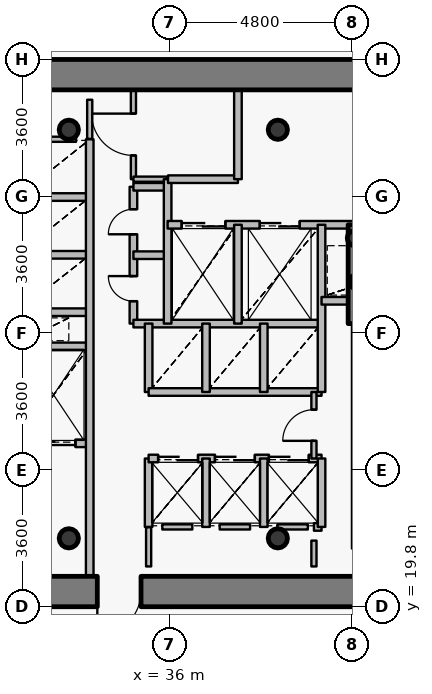
"""IFC4 building model, lengths in metres.
Left out: names, types, materials, properties, quantities, classifications, styles, units other than length and angle.
Written with IfcOpenShell. Run it as: python <this file> out.ifc"""

import sys

from ifc_helpers import new_model, si_unit, direction, frame, frame_2d, origin, origin_2d, place, context, subcontext, project, spatial, rectangle, hollow_circle, extrude, source, transform, mapped, element, fill, save


model = new_model("IFC4")
c1 = context("Model", 3, precision=1e-05, world=origin(), true_north=direction((0.0, 1.0)))
c2 = subcontext(c1, "Body", "Model", "MODEL_VIEW")
j1 = project(units=[si_unit("LENGTHUNIT", "METRE"), si_unit("PLANEANGLEUNIT", "RADIAN")], contexts=[c1])
p1 = place(None, origin())
s1 = spatial("IfcSite", under=j1, at=p1, CompositionType="ELEMENT")
p2 = place(p1, origin())
s2 = spatial("IfcBuilding", under=s1, at=p2, CompositionType="ELEMENT")
p3 = place(p2, frame((0.0, 0.0, 142.2)))
s3 = spatial("IfcBuildingStorey", under=s2, at=p3, CompositionType="ELEMENT", Elevation=142.2)
for number, where, z_axis, x_axis in (
    (1, (33.35, 21.6, 0.0), (0.0, 0.0, 1.0), (1.0, 0.0, 0.0)),
    (2, (38.85, 21.6, 0.0), (0.0, 0.0, 1.0), (1.0, 0.0, 0.0)),
    (3, (38.85, 32.35, 0.0), (0.0, 0.0, 1.0), (1.0, 0.0, 0.0)),
    (4, (33.35, 32.35, 0.0), (0.0, 0.0, 1.0), (1.0, 0.0, 0.0)),
):
    element("IfcColumn", number, at=place(p3, frame(where, z_axis=z_axis, x_axis=x_axis)), inside=s3, PredefinedType="COLUMN", context=c2, shape_type="SweptSolid", body=[
        extrude(hollow_circle(Radius=0.254, WallThickness=0.02, at=origin_2d()), origin(), (0.0, 0.0, 1.0), 3.75),
    ])
for number, where, z_axis, x_axis in (
    (5, (40.95, 28.35, 0.0), (0.0, 0.0, 1.0), (1.0, 0.0, 0.0)),
    (6, (40.88, 29.5, 0.0), (0.0, 0.0, 1.0), (1.0, 0.0, 0.0)),
):
    element("IfcColumn", number, at=place(p3, frame(where, z_axis=z_axis, x_axis=x_axis)), inside=s3, PredefinedType="COLUMN", context=c2, shape_type="SweptSolid", body=[
        extrude(hollow_circle(Radius=0.203, WallThickness=0.016, at=origin_2d()), origin(), (0.0, 0.0, 1.0), 3.75),
    ])
p4 = place(p3, frame((26.6, 33.8, 0.0), z_axis=(0.0, 0.0, 1.0), x_axis=(1.0, 0.0, 0.0)))
e7 = element("IfcWall", 7, at=p4, inside=s3, PredefinedType="SHEAR", context=c2, shape_type="SweptSolid", body=[
    extrude(rectangle(XDim=18.8, YDim=0.8, at=frame_2d((9.4, 0.0))), origin(), (0.0, 0.0, 1.0), 2.9),
])
p5 = place(p3, frame((45.4, 20.2, 0.0), z_axis=(0.0, 0.0, 1.0), x_axis=(-1.0, 0.0, 0.0)))
e8 = element("IfcWall", 8, at=p5, inside=s3, PredefinedType="SHEAR", context=c2, shape_type="SweptSolid", body=[
    extrude(rectangle(XDim=18.8, YDim=0.8, at=frame_2d((9.4, 0.0))), origin(), (0.0, 0.0, 1.0), 2.9),
])
p6 = place(p5, frame((10.15, 0.0, 0.0)))
e9 = element("IfcOpeningElement", 9, at=p6, cuts=e8, PredefinedType="OPENING", context=c2, shape_type="SweptSolid", body=[
    extrude(rectangle(XDim=1.15, YDim=2.15, at=origin_2d()), frame((0.575, 0.41, 1.075), z_axis=(0.0, -1.0, 0.0), x_axis=(1.0, 0.0, 0.0)), (0.0, 0.0, 1.0), 0.82),
])
p7 = place(p3, frame((40.9, 27.25, 0.0), z_axis=(0.0, 0.0, 1.0), x_axis=(0.0, 1.0, 0.0)))
e10 = element("IfcWall", 10, at=p7, inside=s3, PredefinedType="SHEAR", context=c2, shape_type="SweptSolid", body=[
    extrude(rectangle(XDim=2.6, YDim=0.4, at=frame_2d((1.3, 0.0))), origin(), (0.0, 0.0, 1.0), 3.05),
])
p8 = place(p3, frame((32.0, 24.1, 0.0), z_axis=(0.0, 0.0, 1.0), x_axis=(1.0, 0.0, 0.0)))
e11 = element("IfcWall", 11, at=p8, inside=s3, PredefinedType="PARTITIONING", context=c2, shape_type="SweptSolid", body=[
    extrude(rectangle(XDim=1.9, YDim=0.2, at=frame_2d((0.95, 0.0))), origin(), (0.0, 0.0, 1.0), 3.035),
])
p9 = place(p8, frame((0.375, 0.0, 0.0)))
e12 = element("IfcOpeningElement", 12, at=p9, cuts=e11, PredefinedType="OPENING", context=c2, shape_type="SweptSolid", body=[
    extrude(rectangle(XDim=1.15, YDim=2.15, at=origin_2d()), frame((0.575, 0.11, 1.075), z_axis=(0.0, -1.0, 0.0), x_axis=(1.0, 0.0, 0.0)), (0.0, 0.0, 1.0), 0.22),
])
for number, where, z_axis, x_axis in (
    (13, (32.0, 26.65, 0.0), (0.0, 0.0, 1.0), (1.0, 0.0, 0.0)),
    (14, (32.0, 27.55, 0.0), (0.0, 0.0, 1.0), (1.0, 0.0, 0.0)),
    (15, (32.0, 29.06, 0.0), (0.0, 0.0, 1.0), (1.0, 0.0, 0.0)),
    (16, (32.0, 30.58, 0.0), (0.0, 0.0, 1.0), (1.0, 0.0, 0.0)),
):
    element("IfcWall", number, at=place(p3, frame(where, z_axis=z_axis, x_axis=x_axis)), inside=s3, PredefinedType="PARTITIONING", context=c2, shape_type="SweptSolid", body=[
        extrude(rectangle(XDim=1.9, YDim=0.2, at=frame_2d((0.95, 0.0))), origin(), (0.0, 0.0, 1.0), 3.035),
    ])
p10 = place(p3, frame((33.9, 20.6, 0.0), z_axis=(0.0, 0.0, 1.0), x_axis=(0.0, 1.0, 0.0)))
e17 = element("IfcWall", 17, at=p10, inside=s3, PredefinedType="PARTITIONING", context=c2, shape_type="SweptSolid", body=[
    extrude(rectangle(XDim=11.5, YDim=0.2, at=frame_2d((5.75, 0.0))), origin(), (0.0, 0.0, 1.0), 3.035),
])
p11 = place(p3, frame((35.05, 27.25, 0.0), z_axis=(0.0, 0.0, 1.0), x_axis=(0.0, 1.0, 0.0)))
e18 = element("IfcWall", 18, at=p11, inside=s3, PredefinedType="PARTITIONING", context=c2, shape_type="SweptSolid", body=[
    extrude(rectangle(XDim=3.6, YDim=0.2, at=frame_2d((1.8, 0.0))), origin(), (0.0, 0.0, 1.0), 3.45),
])
p12 = place(p11, frame((0.59, 0.0, 0.0)))
e19 = element("IfcOpeningElement", 19, at=p12, cuts=e18, PredefinedType="OPENING", context=c2, shape_type="SweptSolid", body=[
    extrude(rectangle(XDim=0.66, YDim=2.05, at=origin_2d()), frame((0.33, 0.11, 1.025), z_axis=(0.0, -1.0, 0.0), x_axis=(1.0, 0.0, 0.0)), (0.0, 0.0, 1.0), 0.22),
])
p13 = place(p11, frame((2.35, 0.0, 0.0)))
e20 = element("IfcOpeningElement", 20, at=p13, cuts=e18, PredefinedType="OPENING", context=c2, shape_type="SweptSolid", body=[
    extrude(rectangle(XDim=0.66, YDim=2.05, at=origin_2d()), frame((0.33, 0.11, 1.025), z_axis=(0.0, -1.0, 0.0), x_axis=(1.0, 0.0, 0.0)), (0.0, 0.0, 1.0), 0.22),
])
p14 = place(p3, frame((35.05, 27.25, 0.0), z_axis=(0.0, 0.0, 1.0), x_axis=(1.0, 0.0, 0.0)))
e21 = element("IfcWall", 21, at=p14, inside=s3, PredefinedType="PARTITIONING", context=c2, shape_type="SweptSolid", body=[
    extrude(rectangle(XDim=4.95, YDim=0.2, at=frame_2d((2.475, 0.0))), origin(), (0.0, 0.0, 1.0), 3.035),
])
for number, where, z_axis, x_axis in (
    (22, (35.05, 29.05, 0.0), (0.0, 0.0, 1.0), (1.0, 0.0, 0.0)),
    (23, (35.05, 30.85, 0.0), (0.0, 0.0, 1.0), (1.0, 0.0, 0.0)),
):
    element("IfcWall", number, at=place(p3, frame(where, z_axis=z_axis, x_axis=x_axis)), inside=s3, PredefinedType="PARTITIONING", context=c2, shape_type="SweptSolid", body=[
        extrude(rectangle(XDim=0.9, YDim=0.2, at=frame_2d((0.45, 0.0))), origin(), (0.0, 0.0, 1.0), 3.45),
    ])
p15 = place(p3, frame((35.05, 31.05, 0.0), z_axis=(0.0, 0.0, 1.0), x_axis=(0.0, 1.0, 0.0)))
e24 = element("IfcWall", 24, at=p15, inside=s3, PredefinedType="PARTITIONING", context=c2, shape_type="SweptSolid", body=[
    extrude(rectangle(XDim=2.35, YDim=0.135, at=frame_2d((1.175, 0.0))), origin(), (0.0, 0.0, 1.0), 3.035),
])
p16 = place(p15, frame((0.625, 0.0, 0.0)))
e25 = element("IfcOpeningElement", 25, at=p16, cuts=e24, PredefinedType="OPENING", context=c2, shape_type="SweptSolid", body=[
    extrude(rectangle(XDim=1.1, YDim=2.15, at=origin_2d()), frame((0.55, 0.078, 1.075), z_axis=(0.0, -1.0, 0.0), x_axis=(1.0, 0.0, 0.0)), (0.0, 0.0, 1.0), 0.155),
])
p17 = place(p3, frame((35.05, 31.05, 0.0), z_axis=(0.0, 0.0, 1.0), x_axis=(1.0, 0.0, 0.0)))
e26 = element("IfcWall", 26, at=p17, inside=s3, PredefinedType="PARTITIONING", context=c2, shape_type="SweptSolid", body=[
    extrude(rectangle(XDim=0.9, YDim=0.135, at=frame_2d((0.45, 0.0))), origin(), (0.0, 0.0, 1.0), 3.45),
])
p18 = place(p3, frame((35.45, 21.9, 0.0), z_axis=(0.0, 0.0, 1.0), x_axis=(0.0, 1.0, 0.0)))
e27 = element("IfcWall", 27, at=p18, inside=s3, PredefinedType="PARTITIONING", context=c2, shape_type="SweptSolid", body=[
    extrude(rectangle(XDim=1.8, YDim=0.2, at=frame_2d((0.9, 0.0))), origin(), (0.0, 0.0, 1.0), 3.45),
])
p19 = place(p3, frame((35.45, 23.7, 0.0), z_axis=(0.0, 0.0, 1.0), x_axis=(1.0, 0.0, 0.0)))
e28 = element("IfcWall", 28, at=p19, inside=s3, PredefinedType="PARTITIONING", context=c2, shape_type="SweptSolid", body=[
    extrude(rectangle(XDim=4.55, YDim=0.2, at=frame_2d((2.275, 0.0))), origin(), (0.0, 0.0, 1.0), 3.035),
])
p20 = place(p19, frame((0.25, 0.0, 0.0)))
e29 = element("IfcOpeningElement", 29, at=p20, cuts=e28, PredefinedType="OPENING", context=c2, shape_type="SweptSolid", body=[
    extrude(rectangle(XDim=1.05, YDim=2.15, at=origin_2d()), frame((0.525, 0.11, 1.075), z_axis=(0.0, -1.0, 0.0), x_axis=(1.0, 0.0, 0.0)), (0.0, 0.0, 1.0), 0.22),
])
p21 = place(p19, frame((1.745, 0.0, 0.0)))
e30 = element("IfcOpeningElement", 30, at=p21, cuts=e28, PredefinedType="OPENING", context=c2, shape_type="SweptSolid", body=[
    extrude(rectangle(XDim=1.05, YDim=2.15, at=origin_2d()), frame((0.525, 0.11, 1.075), z_axis=(0.0, -1.0, 0.0), x_axis=(1.0, 0.0, 0.0)), (0.0, 0.0, 1.0), 0.22),
])
p22 = place(p19, frame((3.165, 0.0, 0.0)))
e31 = element("IfcOpeningElement", 31, at=p22, cuts=e28, PredefinedType="OPENING", context=c2, shape_type="SweptSolid", body=[
    extrude(rectangle(XDim=1.05, YDim=2.15, at=origin_2d()), frame((0.525, 0.11, 1.075), z_axis=(0.0, -1.0, 0.0), x_axis=(1.0, 0.0, 0.0)), (0.0, 0.0, 1.0), 0.22),
])
p23 = place(p3, frame((35.45, 25.45, 0.0), z_axis=(0.0, 0.0, 1.0), x_axis=(0.0, 1.0, 0.0)))
e32 = element("IfcWall", 32, at=p23, inside=s3, PredefinedType="PARTITIONING", context=c2, shape_type="SweptSolid", body=[
    extrude(rectangle(XDim=1.8, YDim=0.2, at=frame_2d((0.9, 0.0))), origin(), (0.0, 0.0, 1.0), 3.45),
])
p24 = place(p3, frame((35.45, 25.45, 0.0), z_axis=(0.0, 0.0, 1.0), x_axis=(1.0, 0.0, 0.0)))
e33 = element("IfcWall", 33, at=p24, inside=s3, PredefinedType="PARTITIONING", context=c2, shape_type="SweptSolid", body=[
    extrude(rectangle(XDim=4.55, YDim=0.2, at=frame_2d((2.275, 0.0))), origin(), (0.0, 0.0, 1.0), 3.035),
])
p25 = place(p3, frame((35.95, 27.25, 0.0), z_axis=(0.0, 0.0, 1.0), x_axis=(0.0, 1.0, 0.0)))
e34 = element("IfcWall", 34, at=p25, inside=s3, PredefinedType="PARTITIONING", context=c2, shape_type="SweptSolid", body=[
    extrude(rectangle(XDim=3.8, YDim=0.2, at=frame_2d((1.9, 0.0))), origin(), (0.0, 0.0, 1.0), 3.45),
])
p26 = place(p3, frame((35.95, 29.85, 0.0), z_axis=(0.0, 0.0, 1.0), x_axis=(1.0, 0.0, 0.0)))
e35 = element("IfcWall", 35, at=p26, inside=s3, PredefinedType="PARTITIONING", context=c2, shape_type="SweptSolid", body=[
    extrude(rectangle(XDim=8.49, YDim=0.2, at=frame_2d((4.245, 0.0))), origin(), (0.0, 0.0, 1.0), 3.035),
])
p27 = place(p26, frame((6.1, 0.0, 0.0)))
e36 = element("IfcOpeningElement", 36, at=p27, cuts=e35, PredefinedType="OPENING", context=c2, shape_type="SweptSolid", body=[
    extrude(rectangle(XDim=1.2, YDim=2.15, at=origin_2d()), frame((0.6, 0.11, 1.075), z_axis=(0.0, -1.0, 0.0), x_axis=(1.0, 0.0, 0.0)), (0.0, 0.0, 1.0), 0.22),
])
p28 = place(p26, frame((0.37, 0.0, 0.0)))
e37 = element("IfcOpeningElement", 37, at=p28, cuts=e35, PredefinedType="OPENING", context=c2, shape_type="SweptSolid", body=[
    extrude(rectangle(XDim=1.15, YDim=2.15, at=origin_2d()), frame((0.575, 0.11, 1.075), z_axis=(0.0, -1.0, 0.0), x_axis=(1.0, 0.0, 0.0)), (0.0, 0.0, 1.0), 0.22),
])
p29 = place(p26, frame((2.425, 0.0, 0.0)))
e38 = element("IfcOpeningElement", 38, at=p29, cuts=e35, PredefinedType="OPENING", context=c2, shape_type="SweptSolid", body=[
    extrude(rectangle(XDim=1.05, YDim=2.15, at=origin_2d()), frame((0.525, 0.11, 1.075), z_axis=(0.0, -1.0, 0.0), x_axis=(1.0, 0.0, 0.0)), (0.0, 0.0, 1.0), 0.22),
])
p30 = place(p3, frame((35.96, 31.05, 0.0), z_axis=(0.0, 0.0, 1.0), x_axis=(1.0, 0.0, 0.0)))
e39 = element("IfcWall", 39, at=p30, inside=s3, PredefinedType="PARTITIONING", context=c2, shape_type="SweptSolid", body=[
    extrude(rectangle(XDim=1.84, YDim=0.2, at=frame_2d((0.92, 0.0))), origin(), (0.0, 0.0, 1.0), 3.45),
])
for number, where, z_axis, x_axis in (
    (40, (36.96, 21.9, 0.0), (0.0, 0.0, 1.0), (0.0, 1.0, 0.0)),
    (41, (36.96, 25.45, 0.0), (0.0, 0.0, 1.0), (0.0, 1.0, 0.0)),
):
    element("IfcWall", number, at=place(p3, frame(where, z_axis=z_axis, x_axis=x_axis)), inside=s3, PredefinedType="PARTITIONING", context=c2, shape_type="SweptSolid", body=[
        extrude(rectangle(XDim=1.8, YDim=0.2, at=frame_2d((0.9, 0.0))), origin(), (0.0, 0.0, 1.0), 3.45),
    ])
p31 = place(p3, frame((37.8, 27.25, 0.0), z_axis=(0.0, 0.0, 1.0), x_axis=(0.0, 1.0, 0.0)))
e42 = element("IfcWall", 42, at=p31, inside=s3, PredefinedType="PARTITIONING", context=c2, shape_type="SweptSolid", body=[
    extrude(rectangle(XDim=2.6, YDim=0.2, at=frame_2d((1.3, 0.0))), origin(), (0.0, 0.0, 1.0), 3.45),
])
p32 = place(p3, frame((37.8, 31.05, 0.0), z_axis=(0.0, 0.0, 1.0), x_axis=(0.0, 1.0, 0.0)))
e43 = element("IfcWall", 43, at=p32, inside=s3, PredefinedType="PARTITIONING", context=c2, shape_type="SweptSolid", body=[
    extrude(rectangle(XDim=2.35, YDim=0.2, at=frame_2d((1.175, 0.0))), origin(), (0.0, 0.0, 1.0), 3.035),
])
for number, where, z_axis, x_axis in (
    (44, (38.48, 21.9, 0.0), (0.0, 0.0, 1.0), (0.0, 1.0, 0.0)),
    (45, (38.48, 25.45, 0.0), (0.0, 0.0, 1.0), (0.0, 1.0, 0.0)),
):
    element("IfcWall", number, at=place(p3, frame(where, z_axis=z_axis, x_axis=x_axis)), inside=s3, PredefinedType="PARTITIONING", context=c2, shape_type="SweptSolid", body=[
        extrude(rectangle(XDim=1.8, YDim=0.2, at=frame_2d((0.9, 0.0))), origin(), (0.0, 0.0, 1.0), 3.45),
    ])
p33 = place(p3, frame((39.8, 21.9, 0.0), z_axis=(0.0, 0.0, 1.0), x_axis=(1.0, 0.0, 0.0)))
e46 = element("IfcWall", 46, at=p33, inside=s3, PredefinedType="PARTITIONING", context=c2, shape_type="SweptSolid", body=[
    extrude(rectangle(XDim=0.2, YDim=0.2, at=frame_2d((0.1, 0.0))), origin(), (0.0, 0.0, 1.0), 3.45),
])
p34 = place(p3, frame((39.8, 23.7, 0.0), z_axis=(0.0, 0.0, 1.0), x_axis=(0.0, 1.0, 0.0)))
e47 = element("IfcWall", 47, at=p34, inside=s3, PredefinedType="PARTITIONING", context=c2, shape_type="SweptSolid", body=[
    extrude(rectangle(XDim=1.75, YDim=0.135, at=frame_2d((0.875, 0.0))), origin(), (0.0, 0.0, 1.0), 3.45),
])
p35 = place(p34, frame((0.465, 0.0, 0.0)))
e48 = element("IfcOpeningElement", 48, at=p35, cuts=e47, PredefinedType="OPENING", context=c2, shape_type="SweptSolid", body=[
    extrude(rectangle(XDim=0.82, YDim=2.1, at=origin_2d()), frame((0.41, 0.078, 1.05), z_axis=(0.0, -1.0, 0.0), x_axis=(1.0, 0.0, 0.0)), (0.0, 0.0, 1.0), 0.155),
])
p36 = place(p3, frame((40.0, 21.9, 0.0), z_axis=(0.0, 0.0, 1.0), x_axis=(0.0, 1.0, 0.0)))
e49 = element("IfcWall", 49, at=p36, inside=s3, PredefinedType="PARTITIONING", context=c2, shape_type="SweptSolid", body=[
    extrude(rectangle(XDim=1.8, YDim=0.2, at=frame_2d((0.9, 0.0))), origin(), (0.0, 0.0, 1.0), 3.45),
])
p37 = place(p3, frame((40.0, 25.45, 0.0), z_axis=(0.0, 0.0, 1.0), x_axis=(0.0, 1.0, 0.0)))
e50 = element("IfcWall", 50, at=p37, inside=s3, PredefinedType="PARTITIONING", context=c2, shape_type="SweptSolid", body=[
    extrude(rectangle(XDim=4.4, YDim=0.2, at=frame_2d((2.2, 0.0))), origin(), (0.0, 0.0, 1.0), 3.45),
])
p38 = place(p3, frame((40.0, 27.85, 0.0), z_axis=(0.0, 0.0, 1.0), x_axis=(1.0, 0.0, 0.0)))
e51 = element("IfcWall", 51, at=p38, inside=s3, PredefinedType="PARTITIONING", context=c2, shape_type="SweptSolid", body=[
    extrude(rectangle(XDim=0.9, YDim=0.2, at=frame_2d((0.45, 0.0))), origin(), (0.0, 0.0, 1.0), 3.45),
])
p39 = place(p3, frame((40.9, 21.33, 0.0), z_axis=(0.0, 0.0, 1.0), x_axis=(0.0, 1.0, 0.0)))
e52 = element("IfcWall", 52, at=p39, inside=s3, PredefinedType="PARTITIONING", context=c2, shape_type="SweptSolid", body=[
    extrude(rectangle(XDim=5.91, YDim=0.2, at=frame_2d((2.955, 0.0))), origin(), (0.0, 0.0, 1.0), 2.985),
])
p40 = place(p3, frame((36.6, 21.9, 0.0), z_axis=(0.0, 0.0, 1.0), x_axis=(-1.0, 0.0, 0.0)))
e53 = element("IfcWall", 53, at=p40, inside=s3, PredefinedType="PARTITIONING", context=c2, shape_type="SweptSolid", body=[
    extrude(rectangle(XDim=0.79, YDim=0.135, at=frame_2d((0.395, 0.0))), origin(), (0.0, 0.0, 1.0), 3.45),
])
p41 = place(p3, frame((38.12, 21.9, 0.0), z_axis=(0.0, 0.0, 1.0), x_axis=(-1.0, 0.0, 0.0)))
e54 = element("IfcWall", 54, at=p41, inside=s3, PredefinedType="PARTITIONING", context=c2, shape_type="SweptSolid", body=[
    extrude(rectangle(XDim=0.8, YDim=0.135, at=frame_2d((0.4, 0.0))), origin(), (0.0, 0.0, 1.0), 3.45),
])
p42 = place(p3, frame((39.64, 21.9, 0.0), z_axis=(0.0, 0.0, 1.0), x_axis=(-1.0, 0.0, 0.0)))
e55 = element("IfcWall", 55, at=p42, inside=s3, PredefinedType="PARTITIONING", context=c2, shape_type="SweptSolid", body=[
    extrude(rectangle(XDim=0.8, YDim=0.135, at=frame_2d((0.4, 0.0))), origin(), (0.0, 0.0, 1.0), 3.035),
])
p43 = place(p3, frame((32.36, 32.1, 0.0), z_axis=(0.0, 0.0, 1.0), x_axis=(1.0, 0.0, 0.0)))
e56 = element("IfcWall", 56, at=p43, inside=s3, PredefinedType="PARTITIONING", context=c2, shape_type="SweptSolid", body=[
    extrude(rectangle(XDim=1.18, YDim=0.135, at=frame_2d((0.59, 0.0))), origin(), (0.0, 0.0, 1.0), 3.035),
])
p44 = place(p3, frame((39.8, 20.86, 0.0), z_axis=(0.0, 0.0, 1.0), x_axis=(0.0, 1.0, 0.0)))
e57 = element("IfcWall", 57, at=p44, inside=s3, PredefinedType="PARTITIONING", context=c2, shape_type="SweptSolid", body=[
    extrude(rectangle(XDim=0.68, YDim=0.135, at=frame_2d((0.34, 0.0))), origin(), (0.0, 0.0, 1.0), 2.985),
])
for number, where, z_axis, x_axis in (
    (58, (35.45, 21.89, 0.0), (0.0, 0.0, 1.0), (0.0, -1.0, 0.0)),
    (59, (33.9, 32.11, 0.0), (0.0, 0.0, 1.0), (0.0, 1.0, 0.0)),
):
    element("IfcWall", number, at=place(p3, frame(where, z_axis=z_axis, x_axis=x_axis)), inside=s3, PredefinedType="PARTITIONING", context=c2, shape_type="SweptSolid", body=[
        extrude(rectangle(XDim=1.03, YDim=0.135, at=frame_2d((0.515, 0.0))), origin(), (0.0, 0.0, 1.0), 3.035),
    ])
m1 = source(origin(), c2, "Body", "SweptSolid", [
    extrude(rectangle(XDim=1.15, YDim=2.15, at=origin_2d()), frame((0.575, 0.025, 1.075), z_axis=(0.0, -1.0, 0.0), x_axis=(1.0, 0.0, 0.0)), (0.0, 0.0, 1.0), 0.05),
])
p45 = place(p6, origin())
e60 = element("IfcDoor", 60, at=p45, inside=s3, OperationType="SINGLE_SWING_RIGHT", PredefinedType="DOOR", context=c2, shape_type="MappedRepresentation", body=[
    mapped(m1, transform((0.0, 0.0, 0.0), x_axis=(1.0, 0.0, 0.0), y_axis=(0.0, 1.0, 0.0), z_axis=(0.0, 0.0, 1.0), scale=1.0)),
])
fill(e9, e60)
m2 = source(origin(), c2, "Body", "SweptSolid", [
    extrude(rectangle(XDim=1.15, YDim=2.15, at=origin_2d()), frame((0.575, 0.025, 1.075), z_axis=(0.0, -1.0, 0.0), x_axis=(1.0, 0.0, 0.0)), (0.0, 0.0, 1.0), 0.05),
])
p46 = place(p28, origin())
e61 = element("IfcDoor", 61, at=p46, inside=s3, OperationType="DOUBLE_DOOR_SLIDING", PredefinedType="USERDEFINED", context=c2, shape_type="MappedRepresentation", body=[
    mapped(m2, transform((0.0, 0.0, 0.0), x_axis=(1.0, 0.0, 0.0), y_axis=(0.0, 1.0, 0.0), z_axis=(0.0, 0.0, 1.0), scale=1.0)),
])
fill(e37, e61)
p47 = place(p9, origin())
e62 = element("IfcDoor", 62, at=p47, inside=s3, OperationType="DOUBLE_DOOR_SLIDING", PredefinedType="USERDEFINED", context=c2, shape_type="MappedRepresentation", body=[
    mapped(m2, transform((0.0, 0.0, 0.0), x_axis=(1.0, 0.0, 0.0), y_axis=(0.0, 1.0, 0.0), z_axis=(0.0, 0.0, 1.0), scale=1.0)),
])
fill(e12, e62)
m3 = source(origin(), c2, "Body", "SweptSolid", [
    extrude(rectangle(XDim=1.05, YDim=2.15, at=origin_2d()), frame((0.525, 0.025, 1.075), z_axis=(0.0, -1.0, 0.0), x_axis=(1.0, 0.0, 0.0)), (0.0, 0.0, 1.0), 0.05),
])
p48 = place(p29, origin())
e63 = element("IfcDoor", 63, at=p48, inside=s3, OperationType="DOUBLE_DOOR_SLIDING", PredefinedType="USERDEFINED", context=c2, shape_type="MappedRepresentation", body=[
    mapped(m3, transform((0.0, 0.0, 0.0), x_axis=(1.0, 0.0, 0.0), y_axis=(0.0, 1.0, 0.0), z_axis=(0.0, 0.0, 1.0), scale=1.0)),
])
fill(e38, e63)
p49 = place(p20, origin())
e64 = element("IfcDoor", 64, at=p49, inside=s3, OperationType="DOUBLE_DOOR_SLIDING", PredefinedType="USERDEFINED", context=c2, shape_type="MappedRepresentation", body=[
    mapped(m3, transform((0.0, 0.0, 0.0), x_axis=(1.0, 0.0, 0.0), y_axis=(0.0, 1.0, 0.0), z_axis=(0.0, 0.0, 1.0), scale=1.0)),
])
fill(e29, e64)
p50 = place(p21, origin())
e65 = element("IfcDoor", 65, at=p50, inside=s3, OperationType="DOUBLE_DOOR_SLIDING", PredefinedType="USERDEFINED", context=c2, shape_type="MappedRepresentation", body=[
    mapped(m3, transform((0.0, 0.0, 0.0), x_axis=(1.0, 0.0, 0.0), y_axis=(0.0, 1.0, 0.0), z_axis=(0.0, 0.0, 1.0), scale=1.0)),
])
fill(e30, e65)
p51 = place(p22, origin())
e66 = element("IfcDoor", 66, at=p51, inside=s3, OperationType="DOUBLE_DOOR_SLIDING", PredefinedType="USERDEFINED", context=c2, shape_type="MappedRepresentation", body=[
    mapped(m3, transform((0.0, 0.0, 0.0), x_axis=(1.0, 0.0, 0.0), y_axis=(0.0, 1.0, 0.0), z_axis=(0.0, 0.0, 1.0), scale=1.0)),
])
fill(e31, e66)
m4 = source(origin(), c2, "Body", "SweptSolid", [
    extrude(rectangle(XDim=0.66, YDim=2.05, at=origin_2d()), frame((0.33, 0.025, 1.025), z_axis=(0.0, -1.0, 0.0), x_axis=(1.0, 0.0, 0.0)), (0.0, 0.0, 1.0), 0.05),
])
p52 = place(p12, origin())
e67 = element("IfcDoor", 67, at=p52, inside=s3, OperationType="SINGLE_SWING_RIGHT", PredefinedType="USERDEFINED", context=c2, shape_type="MappedRepresentation", body=[
    mapped(m4, transform((0.0, 0.0, 0.0), x_axis=(1.0, 0.0, 0.0), y_axis=(0.0, 1.0, 0.0), z_axis=(0.0, 0.0, 1.0), scale=1.0)),
])
fill(e19, e67)
p53 = place(p13, origin())
e68 = element("IfcDoor", 68, at=p53, inside=s3, OperationType="SINGLE_SWING_LEFT", PredefinedType="USERDEFINED", context=c2, shape_type="MappedRepresentation", body=[
    mapped(m4, transform((0.0, 0.0, 0.0), x_axis=(1.0, 0.0, 0.0), y_axis=(0.0, 1.0, 0.0), z_axis=(0.0, 0.0, 1.0), scale=1.0)),
])
fill(e20, e68)
m5 = source(origin(), c2, "Body", "SweptSolid", [
    extrude(rectangle(XDim=1.1, YDim=2.15, at=origin_2d()), frame((0.55, 0.025, 1.075), z_axis=(0.0, -1.0, 0.0), x_axis=(1.0, 0.0, 0.0)), (0.0, 0.0, 1.0), 0.05),
])
p54 = place(p16, origin())
e69 = element("IfcDoor", 69, at=p54, inside=s3, OperationType="SINGLE_SWING_RIGHT", PredefinedType="DOOR", context=c2, shape_type="MappedRepresentation", body=[
    mapped(m5, transform((0.0, 0.0, 0.0), x_axis=(1.0, 0.0, 0.0), y_axis=(0.0, 1.0, 0.0), z_axis=(0.0, 0.0, 1.0), scale=1.0)),
])
fill(e25, e69)
m6 = source(origin(), c2, "Body", "SweptSolid", [
    extrude(rectangle(XDim=0.82, YDim=2.1, at=origin_2d()), frame((0.41, 0.025, 1.05), z_axis=(0.0, -1.0, 0.0), x_axis=(1.0, 0.0, 0.0)), (0.0, 0.0, 1.0), 0.05),
])
p55 = place(p35, origin())
e70 = element("IfcDoor", 70, at=p55, inside=s3, OperationType="SINGLE_SWING_LEFT", PredefinedType="DOOR", context=c2, shape_type="MappedRepresentation", body=[
    mapped(m6, transform((0.0, 0.0, 0.0), x_axis=(1.0, 0.0, 0.0), y_axis=(0.0, 1.0, 0.0), z_axis=(0.0, 0.0, 1.0), scale=1.0)),
])
fill(e48, e70)
save(model, sys.argv[1])
